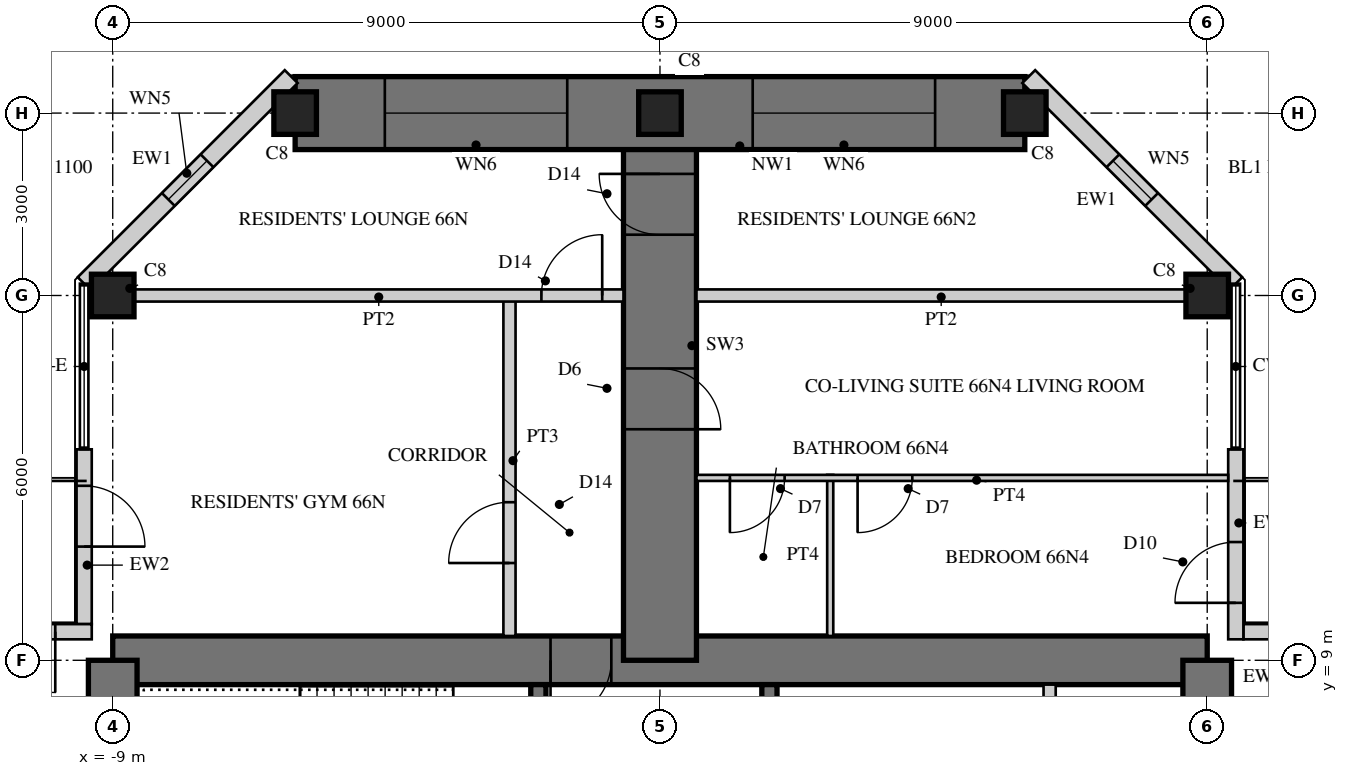
"""IFC4 building model, lengths in metres.
Left out: names, types, materials, properties, quantities, classifications, styles, units other than length and angle.
Written with IfcOpenShell. Run it as: python <this file> out.ifc"""

import sys

from ifc_helpers import new_model, si_unit, direction, frame, frame_2d, origin, origin_2d, place, context, subcontext, project, spatial, rectangle, hollow_rectangle, extrude, element, fill, save


model = new_model("IFC4")
c1 = context("Model", 3, precision=1e-05, world=origin(), true_north=direction((0.0, 1.0)))
c2 = subcontext(c1, "Body", "Model", "MODEL_VIEW")
j1 = project(units=[si_unit("LENGTHUNIT", "METRE"), si_unit("PLANEANGLEUNIT", "RADIAN")], contexts=[c1])
p1 = place(None, origin())
s1 = spatial("IfcSite", under=j1, at=p1, CompositionType="ELEMENT")
p2 = place(p1, origin())
s2 = spatial("IfcBuilding", under=s1, at=p2, CompositionType="ELEMENT")
p3 = place(p2, frame((0.0, 0.0, 257.7)))
s3 = spatial("IfcBuildingStorey", under=s2, at=p3, CompositionType="ELEMENT", Elevation=257.7)
p4 = place(p3, frame((9.0, 9.0, 0.0), z_axis=(0.0, 0.0, 1.0), x_axis=(-1.0, 0.0, 0.0)))
e1 = element("IfcWall", 1, at=p4, inside=s3, PredefinedType="SHEAR", context=c2, shape_type="SweptSolid", body=[
    extrude(rectangle(XDim=18.0, YDim=0.8, at=frame_2d((9.0, 0.0))), origin(), (0.0, 0.0, 1.0), 3.4),
])
p5 = place(p4, frame((9.8, 0.0, 0.0)))
e2 = element("IfcOpeningElement", 2, at=p5, cuts=e1, PredefinedType="OPENING", context=c2, shape_type="SweptSolid", body=[
    extrude(rectangle(XDim=1.0, YDim=2.4, at=frame_2d((0.5, 1.2))), frame((0.0, 0.41, 0.0), z_axis=(0.0, -1.0, 0.0), x_axis=(1.0, 0.0, 0.0)), (0.0, 0.0, 1.0), 0.82),
])
p6 = place(p3, frame((9.0, -9.0, 0.0), z_axis=(0.0, 0.0, 1.0), x_axis=(0.0, 1.0, 0.0)))
e3 = element("IfcWall", 3, at=p6, inside=s3, PredefinedType="SHEAR", context=c2, shape_type="SweptSolid", body=[
    extrude(rectangle(XDim=18.0, YDim=0.8, at=frame_2d((9.0, 0.0))), origin(), (0.0, 0.0, 1.0), 3.4),
])
p7 = place(p6, frame((9.8, 0.0, 0.0)))
e4 = element("IfcOpeningElement", 4, at=p7, cuts=e3, PredefinedType="OPENING", context=c2, shape_type="SweptSolid", body=[
    extrude(rectangle(XDim=1.0, YDim=2.4, at=frame_2d((0.5, 1.2))), frame((0.0, 0.41, 0.0), z_axis=(0.0, -1.0, 0.0), x_axis=(1.0, 0.0, 0.0)), (0.0, 0.0, 1.0), 0.82),
])
p8 = place(p3, frame((-9.0, 9.0, 0.0), z_axis=(0.0, 0.0, 1.0), x_axis=(0.0, -1.0, 0.0)))
e5 = element("IfcWall", 5, at=p8, inside=s3, PredefinedType="SHEAR", context=c2, shape_type="SweptSolid", body=[
    extrude(rectangle(XDim=18.0, YDim=0.8, at=frame_2d((9.0, 0.0))), origin(), (0.0, 0.0, 1.0), 3.4),
])
p9 = place(p8, frame((9.8, 0.0, 0.0)))
e6 = element("IfcOpeningElement", 6, at=p9, cuts=e5, PredefinedType="OPENING", context=c2, shape_type="SweptSolid", body=[
    extrude(rectangle(XDim=1.0, YDim=2.4, at=frame_2d((0.5, 1.2))), frame((0.0, 0.41, 0.0), z_axis=(0.0, -1.0, 0.0), x_axis=(1.0, 0.0, 0.0)), (0.0, 0.0, 1.0), 0.82),
])
p10 = place(p3, frame((1.8, 1.875, 0.0), z_axis=(0.0, 0.0, 1.0), x_axis=(0.0, 1.0, 0.0)))
e7 = element("IfcWall", 7, at=p10, inside=s3, PredefinedType="SHEAR", context=c2, shape_type="SweptSolid", body=[
    extrude(rectangle(XDim=6.725, YDim=0.25, at=frame_2d((3.363, 0.0))), origin(), (0.0, 0.0, 1.0), 3.4),
])
p11 = place(p10, frame((1.875, 0.0, 0.0)))
e8 = element("IfcOpeningElement", 8, at=p11, cuts=e7, PredefinedType="OPENING", context=c2, shape_type="SweptSolid", body=[
    extrude(rectangle(XDim=1.6, YDim=2.4, at=frame_2d((0.8, 1.2))), frame((0.0, 0.135, 0.0), z_axis=(0.0, -1.0, 0.0), x_axis=(1.0, 0.0, 0.0)), (0.0, 0.0, 1.0), 0.27),
])
p12 = place(p3, frame((6.408, 5.975, 0.0), z_axis=(0.0, 0.0, 1.0), x_axis=(0.0, 1.0, 0.0)))
e9 = element("IfcWall", 9, at=p12, inside=s3, PredefinedType="PARTITIONING", context=c2, shape_type="SweptSolid", body=[
    extrude(rectangle(XDim=2.625, YDim=0.2, at=frame_2d((1.312, 0.0))), origin(), (0.0, 0.0, 1.0), 3.4),
])
p13 = place(p3, frame((-2.0, 1.675, 0.0), z_axis=(0.0, 0.0, 1.0), x_axis=(0.0, 1.0, 0.0)))
e10 = element("IfcWall", 10, at=p13, inside=s3, PredefinedType="SHEAR", context=c2, shape_type="SweptSolid", body=[
    extrude(rectangle(XDim=6.925, YDim=0.25, at=frame_2d((3.462, 0.0))), origin(), (0.0, 0.0, 1.0), 3.4),
])
p14 = place(p13, frame((0.725, 0.0, 0.0)))
e11 = element("IfcOpeningElement", 11, at=p14, cuts=e10, PredefinedType="OPENING", context=c2, shape_type="SweptSolid", body=[
    extrude(rectangle(XDim=1.0, YDim=2.1, at=frame_2d((0.5, 1.05))), frame((0.0, 0.135, 0.0), z_axis=(0.0, -1.0, 0.0), x_axis=(1.0, 0.0, 0.0)), (0.0, 0.0, 1.0), 0.27),
])
p15 = place(p3, frame((0.0, 9.0, 0.0), z_axis=(0.0, 0.0, 1.0), x_axis=(0.0, 1.0, 0.0)))
e12 = element("IfcWall", 12, at=p15, inside=s3, PredefinedType="SHEAR", context=c2, shape_type="SweptSolid", body=[
    extrude(rectangle(XDim=9.0, YDim=1.2, at=frame_2d((4.5, 0.0))), origin(), (0.0, 0.0, 1.0), 3.4),
])
p16 = place(p15, frame((3.8, 0.0, 0.0)))
e13 = element("IfcOpeningElement", 13, at=p16, cuts=e12, PredefinedType="OPENING", context=c2, shape_type="SweptSolid", body=[
    extrude(rectangle(XDim=1.0, YDim=2.15, at=frame_2d((0.5, 1.075))), frame((0.0, 0.61, 0.0), z_axis=(0.0, -1.0, 0.0), x_axis=(1.0, 0.0, 0.0)), (0.0, 0.0, 1.0), 1.22),
])
p17 = place(p15, frame((7.0, 0.0, 0.0)))
e14 = element("IfcOpeningElement", 14, at=p17, cuts=e12, PredefinedType="OPENING", context=c2, shape_type="SweptSolid", body=[
    extrude(rectangle(XDim=1.0, YDim=2.2, at=frame_2d((0.5, 1.1))), frame((0.0, 0.61, 0.0), z_axis=(0.0, -1.0, 0.0), x_axis=(1.0, 0.0, 0.0)), (0.0, 0.0, 1.0), 1.22),
])
p18 = place(p3, frame((6.0, 18.0, 0.0), z_axis=(0.0, 0.0, 1.0), x_axis=(-1.0, 0.0, 0.0)))
e15 = element("IfcWall", 15, at=p18, inside=s3, PredefinedType="SHEAR", context=c2, shape_type="SweptSolid", body=[
    extrude(rectangle(XDim=12.0, YDim=1.2, at=frame_2d((6.0, 0.0))), origin(), (0.0, 0.0, 1.0), 3.4),
])
p19 = place(p18, frame((1.475, 0.0, 0.6)))
e16 = element("IfcOpeningElement", 16, at=p19, cuts=e15, PredefinedType="OPENING", context=c2, shape_type="SweptSolid", body=[
    extrude(rectangle(XDim=3.0, YDim=2.4, at=frame_2d((1.5, 1.2))), frame((0.0, 0.61, 0.0), z_axis=(0.0, -1.0, 0.0), x_axis=(1.0, 0.0, 0.0)), (0.0, 0.0, 1.0), 1.22),
])
p20 = place(p18, frame((7.525, 0.0, 0.6)))
e17 = element("IfcOpeningElement", 17, at=p20, cuts=e15, PredefinedType="OPENING", context=c2, shape_type="SweptSolid", body=[
    extrude(rectangle(XDim=3.0, YDim=2.4, at=frame_2d((1.5, 1.2))), frame((0.0, 0.61, 0.0), z_axis=(0.0, -1.0, 0.0), x_axis=(1.0, 0.0, 0.0)), (0.0, 0.0, 1.0), 1.22),
])
for number, where, z_axis, x_axis in (
    (18, (9.0, 15.0, 0.0), (0.0, 0.0, 1.0), (1.0, 0.0, 0.0)),
    (19, (-9.0, 15.0, 0.0), (0.0, 0.0, 1.0), (1.0, 0.0, 0.0)),
    (20, (6.0, 18.0, 0.0), (0.0, 0.0, 1.0), (1.0, 0.0, 0.0)),
    (21, (0.0, 18.0, 0.0), (0.0, 0.0, 1.0), (1.0, 0.0, 0.0)),
    (22, (-6.0, 18.0, 0.0), (0.0, 0.0, 1.0), (1.0, 0.0, 0.0)),
):
    element("IfcColumn", number, at=place(p3, frame(where, z_axis=z_axis, x_axis=x_axis)), inside=s3, PredefinedType="COLUMN", context=c2, shape_type="SweptSolid", body=[
        extrude(rectangle(XDim=0.7, YDim=0.7, at=origin_2d()), origin(), (0.0, 0.0, 1.0), 3.4),
    ])
p21 = place(p3, frame((12.47, 9.47, 0.0), z_axis=(0.0, 0.0, 1.0), x_axis=(-1.0, 0.0, 0.0)))
e23 = element("IfcWall", 23, at=p21, inside=s3, PredefinedType="SOLIDWALL", context=c2, shape_type="SweptSolid", body=[
    extrude(rectangle(XDim=2.875, YDim=0.25, at=frame_2d((1.438, 0.0))), origin(), (0.0, 0.0, 1.0), 3.22),
])
p22 = place(p21, frame((0.6, 0.0, 0.0)))
e24 = element("IfcOpeningElement", 24, at=p22, cuts=e23, PredefinedType="OPENING", context=c2, shape_type="SweptSolid", body=[
    extrude(rectangle(XDim=1.0, YDim=2.2, at=frame_2d((0.5, 1.1))), frame((0.0, 0.135, 0.0), z_axis=(0.0, -1.0, 0.0), x_axis=(1.0, 0.0, 0.0)), (0.0, 0.0, 1.0), 0.27),
])
p23 = place(p3, frame((9.47, 9.345, 0.0), z_axis=(0.0, 0.0, 1.0), x_axis=(0.0, 1.0, 0.0)))
e25 = element("IfcWall", 25, at=p23, inside=s3, PredefinedType="SOLIDWALL", context=c2, shape_type="SweptSolid", body=[
    extrude(rectangle(XDim=3.125, YDim=0.25, at=frame_2d((1.562, 0.0))), origin(), (0.0, 0.0, 1.0), 3.22),
])
p24 = place(p23, frame((0.6, 0.0, 0.0)))
e26 = element("IfcOpeningElement", 26, at=p24, cuts=e25, PredefinedType="OPENING", context=c2, shape_type="SweptSolid", body=[
    extrude(rectangle(XDim=1.0, YDim=2.2, at=frame_2d((0.5, 1.1))), frame((0.0, 0.135, 0.0), z_axis=(0.0, -1.0, 0.0), x_axis=(1.0, 0.0, 0.0)), (0.0, 0.0, 1.0), 0.27),
])
p25 = place(p3, frame((9.47, 15.195, 0.0), z_axis=(0.0, 0.0, 1.0), x_axis=(-0.707081433678, 0.707132127787, 0.0)))
e27 = element("IfcWall", 27, at=p25, inside=s3, PredefinedType="SOLIDWALL", context=c2, shape_type="SweptSolid", body=[
    extrude(rectangle(XDim=4.816, YDim=0.3, at=frame_2d((2.408, 0.0))), origin(), (0.0, 0.0, 1.0), 3.22),
])
p26 = place(p25, frame((1.958, 0.0, 0.3)))
e28 = element("IfcOpeningElement", 28, at=p26, cuts=e27, PredefinedType="OPENING", context=c2, shape_type="SweptSolid", body=[
    extrude(rectangle(XDim=0.9, YDim=2.4, at=frame_2d((0.45, 1.2))), frame((0.0, 0.16, 0.0), z_axis=(0.0, -1.0, 0.0), x_axis=(1.0, 0.0, 0.0)), (0.0, 0.0, 1.0), 0.32),
])
p27 = place(p3, frame((-6.065, 18.6, 0.0), z_axis=(0.0, 0.0, 1.0), x_axis=(-0.707081433678, -0.707132127787, 0.0)))
e29 = element("IfcWall", 29, at=p27, inside=s3, PredefinedType="SOLIDWALL", context=c2, shape_type="SweptSolid", body=[
    extrude(rectangle(XDim=4.816, YDim=0.3, at=frame_2d((2.408, 0.0))), origin(), (0.0, 0.0, 1.0), 3.22),
])
p28 = place(p27, frame((1.958, 0.0, 0.3)))
e30 = element("IfcOpeningElement", 30, at=p28, cuts=e29, PredefinedType="OPENING", context=c2, shape_type="SweptSolid", body=[
    extrude(rectangle(XDim=0.9, YDim=2.4, at=frame_2d((0.45, 1.2))), frame((0.0, 0.16, 0.0), z_axis=(0.0, -1.0, 0.0), x_axis=(1.0, 0.0, 0.0)), (0.0, 0.0, 1.0), 0.32),
])
p29 = place(p3, frame((-9.47, 12.47, 0.0), z_axis=(0.0, 0.0, 1.0), x_axis=(0.0, -1.0, 0.0)))
e31 = element("IfcWall", 31, at=p29, inside=s3, PredefinedType="SOLIDWALL", context=c2, shape_type="SweptSolid", body=[
    extrude(rectangle(XDim=2.875, YDim=0.25, at=frame_2d((1.438, 0.0))), origin(), (0.0, 0.0, 1.0), 3.22),
])
p30 = place(p29, frame((0.6, 0.0, 0.0)))
e32 = element("IfcOpeningElement", 32, at=p30, cuts=e31, PredefinedType="OPENING", context=c2, shape_type="SweptSolid", body=[
    extrude(rectangle(XDim=1.0, YDim=2.2, at=frame_2d((0.5, 1.1))), frame((0.0, 0.135, 0.0), z_axis=(0.0, -1.0, 0.0), x_axis=(1.0, 0.0, 0.0)), (0.0, 0.0, 1.0), 0.27),
])
p31 = place(p3, frame((-9.345, 9.47, 0.0), z_axis=(0.0, 0.0, 1.0), x_axis=(-1.0, 0.0, 0.0)))
e33 = element("IfcWall", 33, at=p31, inside=s3, PredefinedType="SOLIDWALL", context=c2, shape_type="SweptSolid", body=[
    extrude(rectangle(XDim=3.125, YDim=0.25, at=frame_2d((1.562, 0.0))), origin(), (0.0, 0.0, 1.0), 3.22),
])
p32 = place(p31, frame((0.6, 0.0, 0.0)))
e34 = element("IfcOpeningElement", 34, at=p32, cuts=e33, PredefinedType="OPENING", context=c2, shape_type="SweptSolid", body=[
    extrude(rectangle(XDim=1.0, YDim=2.2, at=frame_2d((0.5, 1.1))), frame((0.0, 0.135, 0.0), z_axis=(0.0, -1.0, 0.0), x_axis=(1.0, 0.0, 0.0)), (0.0, 0.0, 1.0), 0.27),
])
p33 = place(p3, frame((2.8, 9.4, 0.0), z_axis=(0.0, 0.0, 1.0), x_axis=(0.0, 1.0, 0.0)))
e35 = element("IfcWall", 35, at=p33, inside=s3, PredefinedType="PARTITIONING", context=c2, shape_type="SweptSolid", body=[
    extrude(rectangle(XDim=2.65, YDim=0.1, at=frame_2d((1.325, 0.0))), origin(), (0.0, 0.0, 1.0), 3.22),
])
p34 = place(p3, frame((9.345, 12.0, 0.0), z_axis=(0.0, 0.0, 1.0), x_axis=(-1.0, 0.0, 0.0)))
e36 = element("IfcWall", 36, at=p34, inside=s3, PredefinedType="PARTITIONING", context=c2, shape_type="SweptSolid", body=[
    extrude(rectangle(XDim=8.745, YDim=0.1, at=frame_2d((4.373, 0.0))), origin(), (0.0, 0.0, 1.0), 3.22),
])
p35 = place(p34, frame((5.195, 0.0, 0.0)))
e37 = element("IfcOpeningElement", 37, at=p35, cuts=e36, PredefinedType="OPENING", context=c2, shape_type="SweptSolid", body=[
    extrude(rectangle(XDim=0.9, YDim=2.1, at=frame_2d((0.45, 1.05))), frame((0.0, 0.06, 0.0), z_axis=(0.0, -1.0, 0.0), x_axis=(1.0, 0.0, 0.0)), (0.0, 0.0, 1.0), 0.12),
])
p36 = place(p34, frame((7.295, 0.0, 0.0)))
e38 = element("IfcOpeningElement", 38, at=p36, cuts=e36, PredefinedType="OPENING", context=c2, shape_type="SweptSolid", body=[
    extrude(rectangle(XDim=0.9, YDim=2.1, at=frame_2d((0.45, 1.05))), frame((0.0, 0.06, 0.0), z_axis=(0.0, -1.0, 0.0), x_axis=(1.0, 0.0, 0.0)), (0.0, 0.0, 1.0), 0.12),
])
p37 = place(p3, frame((-2.475, 9.4, 0.0), z_axis=(0.0, 0.0, 1.0), x_axis=(0.0, 1.0, 0.0)))
e39 = element("IfcWall", 39, at=p37, inside=s3, PredefinedType="SOLIDWALL", context=c2, shape_type="SweptSolid", body=[
    extrude(rectangle(XDim=5.6, YDim=0.2, at=frame_2d((2.8, 0.0))), origin(), (0.0, 0.0, 1.0), 3.22),
])
p38 = place(p37, frame((1.2, 0.0, 0.0)))
e40 = element("IfcOpeningElement", 40, at=p38, cuts=e39, PredefinedType="OPENING", context=c2, shape_type="SweptSolid", body=[
    extrude(rectangle(XDim=1.0, YDim=2.2, at=frame_2d((0.5, 1.1))), frame((0.0, 0.11, 0.0), z_axis=(0.0, -1.0, 0.0), x_axis=(1.0, 0.0, 0.0)), (0.0, 0.0, 1.0), 0.22),
])
p39 = place(p3, frame((8.65, 15.0, 0.0), z_axis=(0.0, 0.0, 1.0), x_axis=(-1.0, 0.0, 0.0)))
e41 = element("IfcWall", 41, at=p39, inside=s3, PredefinedType="SOLIDWALL", context=c2, shape_type="SweptSolid", body=[
    extrude(rectangle(XDim=8.05, YDim=0.2, at=frame_2d((4.025, 0.0))), origin(), (0.0, 0.0, 1.0), 2.52),
])
p40 = place(p3, frame((-0.6, 15.0, 0.0), z_axis=(0.0, 0.0, 1.0), x_axis=(-1.0, 0.0, 0.0)))
e42 = element("IfcWall", 42, at=p40, inside=s3, PredefinedType="SOLIDWALL", context=c2, shape_type="SweptSolid", body=[
    extrude(rectangle(XDim=8.05, YDim=0.2, at=frame_2d((4.025, 0.0))), origin(), (0.0, 0.0, 1.0), 2.52),
])
p41 = place(p40, frame((0.35, 0.0, 0.0)))
e43 = element("IfcOpeningElement", 43, at=p41, cuts=e42, PredefinedType="OPENING", context=c2, shape_type="SweptSolid", body=[
    extrude(rectangle(XDim=1.0, YDim=2.2, at=frame_2d((0.5, 1.1))), frame((0.0, 0.11, 0.0), z_axis=(0.0, -1.0, 0.0), x_axis=(1.0, 0.0, 0.0)), (0.0, 0.0, 1.0), 0.22),
])
p42 = place(p24, origin())
e44 = element("IfcDoor", 44, at=p42, inside=s3, OperationType="SINGLE_SWING_LEFT", PredefinedType="DOOR", context=c2, shape_type="SweptSolid", body=[
    extrude(hollow_rectangle(XDim=1.0, YDim=2.2, WallThickness=0.06, at=frame_2d((0.5, 1.1))), frame((0.0, 0.025, 0.0), z_axis=(0.0, -1.0, 0.0), x_axis=(1.0, 0.0, 0.0)), (0.0, 0.0, 1.0), 0.05),
    extrude(rectangle(XDim=0.879, YDim=2.079, at=frame_2d((0.5, 1.1))), frame((0.0, 0.025, 0.0), z_axis=(0.0, -1.0, 0.0), x_axis=(1.0, 0.0, 0.0)), (0.0, 0.0, 1.0), 0.05),
])
fill(e26, e44)
p43 = place(p26, origin())
e45 = element("IfcWindow", 45, at=p43, inside=s3, PartitioningType="SINGLE_PANEL", PredefinedType="WINDOW", context=c2, shape_type="SweptSolid", body=[
    extrude(hollow_rectangle(XDim=0.9, YDim=2.4, WallThickness=0.06, at=frame_2d((0.45, 1.2))), frame((0.0, 0.03, 0.0), z_axis=(0.0, -1.0, 0.0), x_axis=(1.0, 0.0, 0.0)), (0.0, 0.0, 1.0), 0.06),
    extrude(rectangle(XDim=0.779, YDim=2.279, at=frame_2d((0.45, 1.2))), frame((0.0, 0.03, 0.0), z_axis=(0.0, -1.0, 0.0), x_axis=(1.0, 0.0, 0.0)), (0.0, 0.0, 1.0), 0.06),
])
fill(e28, e45)
p44 = place(p19, origin())
e46 = element("IfcWindow", 46, at=p44, inside=s3, PartitioningType="SINGLE_PANEL", PredefinedType="WINDOW", context=c2, shape_type="SweptSolid", body=[
    extrude(hollow_rectangle(XDim=3.0, YDim=2.4, WallThickness=0.06, at=frame_2d((1.5, 1.2))), frame((0.0, 0.03, 0.0), z_axis=(0.0, -1.0, 0.0), x_axis=(1.0, 0.0, 0.0)), (0.0, 0.0, 1.0), 0.06),
    extrude(rectangle(XDim=2.879, YDim=2.279, at=frame_2d((1.5, 1.2))), frame((0.0, 0.03, 0.0), z_axis=(0.0, -1.0, 0.0), x_axis=(1.0, 0.0, 0.0)), (0.0, 0.0, 1.0), 0.06),
])
fill(e16, e46)
p45 = place(p20, origin())
e47 = element("IfcWindow", 47, at=p45, inside=s3, PartitioningType="SINGLE_PANEL", PredefinedType="WINDOW", context=c2, shape_type="SweptSolid", body=[
    extrude(hollow_rectangle(XDim=3.0, YDim=2.4, WallThickness=0.06, at=frame_2d((1.5, 1.2))), frame((0.0, 0.03, 0.0), z_axis=(0.0, -1.0, 0.0), x_axis=(1.0, 0.0, 0.0)), (0.0, 0.0, 1.0), 0.06),
    extrude(rectangle(XDim=2.879, YDim=2.279, at=frame_2d((1.5, 1.2))), frame((0.0, 0.03, 0.0), z_axis=(0.0, -1.0, 0.0), x_axis=(1.0, 0.0, 0.0)), (0.0, 0.0, 1.0), 0.06),
])
fill(e17, e47)
p46 = place(p28, origin())
e48 = element("IfcWindow", 48, at=p46, inside=s3, PartitioningType="SINGLE_PANEL", PredefinedType="WINDOW", context=c2, shape_type="SweptSolid", body=[
    extrude(hollow_rectangle(XDim=0.9, YDim=2.4, WallThickness=0.06, at=frame_2d((0.45, 1.2))), frame((0.0, 0.03, 0.0), z_axis=(0.0, -1.0, 0.0), x_axis=(1.0, 0.0, 0.0)), (0.0, 0.0, 1.0), 0.06),
    extrude(rectangle(XDim=0.779, YDim=2.279, at=frame_2d((0.45, 1.2))), frame((0.0, 0.03, 0.0), z_axis=(0.0, -1.0, 0.0), x_axis=(1.0, 0.0, 0.0)), (0.0, 0.0, 1.0), 0.06),
])
fill(e30, e48)
p47 = place(p30, origin())
e49 = element("IfcDoor", 49, at=p47, inside=s3, OperationType="SINGLE_SWING_RIGHT", PredefinedType="DOOR", context=c2, shape_type="SweptSolid", body=[
    extrude(hollow_rectangle(XDim=1.0, YDim=2.2, WallThickness=0.06, at=frame_2d((0.5, 1.1))), frame((0.0, 0.025, 0.0), z_axis=(0.0, -1.0, 0.0), x_axis=(1.0, 0.0, 0.0)), (0.0, 0.0, 1.0), 0.05),
    extrude(rectangle(XDim=0.879, YDim=2.079, at=frame_2d((0.5, 1.1))), frame((0.0, 0.025, 0.0), z_axis=(0.0, -1.0, 0.0), x_axis=(1.0, 0.0, 0.0)), (0.0, 0.0, 1.0), 0.05),
])
fill(e32, e49)
p48 = place(p32, origin())
e50 = element("IfcDoor", 50, at=p48, inside=s3, OperationType="SINGLE_SWING_LEFT", PredefinedType="DOOR", context=c2, shape_type="SweptSolid", body=[
    extrude(hollow_rectangle(XDim=1.0, YDim=2.2, WallThickness=0.06, at=frame_2d((0.5, 1.1))), frame((0.0, 0.025, 0.0), z_axis=(0.0, -1.0, 0.0), x_axis=(1.0, 0.0, 0.0)), (0.0, 0.0, 1.0), 0.05),
    extrude(rectangle(XDim=0.879, YDim=2.079, at=frame_2d((0.5, 1.1))), frame((0.0, 0.025, 0.0), z_axis=(0.0, -1.0, 0.0), x_axis=(1.0, 0.0, 0.0)), (0.0, 0.0, 1.0), 0.05),
])
fill(e34, e50)
p49 = place(p35, origin())
e51 = element("IfcDoor", 51, at=p49, inside=s3, OperationType="SINGLE_SWING_RIGHT", PredefinedType="DOOR", context=c2, shape_type="SweptSolid", body=[
    extrude(rectangle(XDim=0.9, YDim=2.1, at=frame_2d((0.45, 1.05))), frame((0.0, 0.025, 0.0), z_axis=(0.0, -1.0, 0.0), x_axis=(1.0, 0.0, 0.0)), (0.0, 0.0, 1.0), 0.05),
])
fill(e37, e51)
p50 = place(p36, origin())
e52 = element("IfcDoor", 52, at=p50, inside=s3, OperationType="SINGLE_SWING_RIGHT", PredefinedType="DOOR", context=c2, shape_type="SweptSolid", body=[
    extrude(rectangle(XDim=0.9, YDim=2.1, at=frame_2d((0.45, 1.05))), frame((0.0, 0.025, 0.0), z_axis=(0.0, -1.0, 0.0), x_axis=(1.0, 0.0, 0.0)), (0.0, 0.0, 1.0), 0.05),
])
fill(e38, e52)
p51 = place(p38, origin())
e53 = element("IfcDoor", 53, at=p51, inside=s3, OperationType="SINGLE_SWING_LEFT", PredefinedType="DOOR", context=c2, shape_type="SweptSolid", body=[
    extrude(rectangle(XDim=1.0, YDim=2.2, at=frame_2d((0.5, 1.1))), frame((0.0, 0.025, 0.0), z_axis=(0.0, -1.0, 0.0), x_axis=(1.0, 0.0, 0.0)), (0.0, 0.0, 1.0), 0.05),
])
fill(e40, e53)
p52 = place(p41, frame((1.0, 0.0, 0.0), z_axis=(0.0, 0.0, 1.0), x_axis=(-1.0, 0.0, 0.0)))
e54 = element("IfcDoor", 54, at=p52, inside=s3, OperationType="SINGLE_SWING_RIGHT", PredefinedType="DOOR", context=c2, shape_type="SweptSolid", body=[
    extrude(rectangle(XDim=1.0, YDim=2.2, at=frame_2d((0.5, 1.1))), frame((0.0, 0.025, 0.0), z_axis=(0.0, -1.0, 0.0), x_axis=(1.0, 0.0, 0.0)), (0.0, 0.0, 1.0), 0.05),
])
fill(e43, e54)
p53 = place(p16, frame((1.0, 0.0, 0.0), z_axis=(0.0, 0.0, 1.0), x_axis=(-1.0, 0.0, 0.0)))
e55 = element("IfcDoor", 55, at=p53, inside=s3, OperationType="SINGLE_SWING_RIGHT", PredefinedType="DOOR", context=c2, shape_type="SweptSolid", body=[
    extrude(rectangle(XDim=1.0, YDim=2.15, at=frame_2d((0.5, 1.075))), frame((0.0, 0.025, 0.0), z_axis=(0.0, -1.0, 0.0), x_axis=(1.0, 0.0, 0.0)), (0.0, 0.0, 1.0), 0.05),
])
fill(e13, e55)
p54 = place(p17, origin())
e56 = element("IfcDoor", 56, at=p54, inside=s3, OperationType="SINGLE_SWING_RIGHT", PredefinedType="DOOR", context=c2, shape_type="SweptSolid", body=[
    extrude(rectangle(XDim=1.0, YDim=2.2, at=frame_2d((0.5, 1.1))), frame((0.0, 0.025, 0.0), z_axis=(0.0, -1.0, 0.0), x_axis=(1.0, 0.0, 0.0)), (0.0, 0.0, 1.0), 0.05),
])
fill(e14, e56)
p55 = place(p5, origin())
e57 = element("IfcDoor", 57, at=p55, inside=s3, OperationType="SINGLE_SWING_RIGHT", PredefinedType="DOOR", context=c2, shape_type="SweptSolid", body=[
    extrude(rectangle(XDim=1.0, YDim=2.4, at=frame_2d((0.5, 1.2))), frame((0.0, 0.055, 0.0), z_axis=(0.0, -1.0, 0.0), x_axis=(1.0, 0.0, 0.0)), (0.0, 0.0, 1.0), 0.05),
])
fill(e2, e57)
save(model, sys.argv[1])
